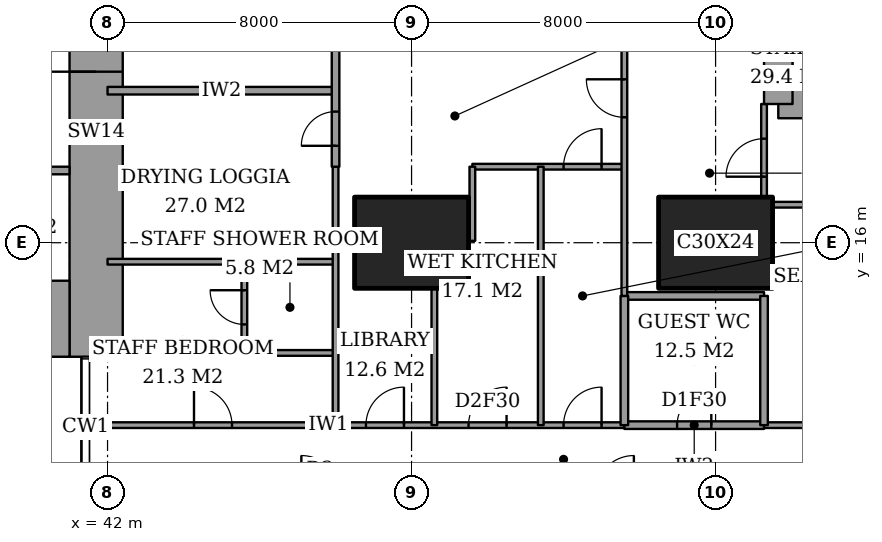
"""IFC4 building model, lengths in metres.
Left out: names, types, materials, properties, quantities, classifications, styles, units other than length and angle.
Written with IfcOpenShell. Run it as: python <this file> out.ifc"""

import sys

from ifc_helpers import new_model, si_unit, direction, frame, frame_2d, origin, origin_2d, place, context, subcontext, project, spatial, rectangle, extrude, element, fill, save


model = new_model("IFC4")
c1 = context("Model", 3, precision=1e-05, world=origin(), true_north=direction((0.0, 1.0)))
c2 = subcontext(c1, "Body", "Model", "MODEL_VIEW")
j1 = project(units=[si_unit("LENGTHUNIT", "METRE"), si_unit("PLANEANGLEUNIT", "RADIAN")], contexts=[c1])
p1 = place(None, origin())
s1 = spatial("IfcSite", under=j1, at=p1, CompositionType="ELEMENT")
p2 = place(p1, origin())
s2 = spatial("IfcBuilding", under=s1, at=p2, CompositionType="ELEMENT")
p3 = place(p2, frame((0.0, 0.0, 259.2)))
s3 = spatial("IfcBuildingStorey", under=s2, at=p3, CompositionType="ELEMENT", Elevation=259.2)
for number, where, z_axis, x_axis in (
    (1, (50.0, 16.0, 0.0), (0.0, 0.0, 1.0), (1.0, 0.0, 0.0)),
    (2, (58.0, 16.0, 0.0), (0.0, 0.0, 1.0), (1.0, 0.0, 0.0)),
):
    element("IfcColumn", number, at=place(p3, frame(where, z_axis=z_axis, x_axis=x_axis)), inside=s3, PredefinedType="COLUMN", context=c2, shape_type="SweptSolid", body=[
        extrude(rectangle(XDim=3.0, YDim=2.4, at=origin_2d()), origin(), (0.0, 0.0, 1.0), 3.6),
    ])
p4 = place(p3, frame((37.85, 14.0, 0.0), z_axis=(0.0, 0.0, 1.0), x_axis=(1.0, 0.0, 0.0)))
e3 = element("IfcWall", 3, at=p4, inside=s3, PredefinedType="SHEAR", context=c2, shape_type="SweptSolid", body=[
    extrude(rectangle(XDim=3.15, YDim=2.0, at=frame_2d((1.575, 0.0))), origin(), (0.0, 0.0, 1.0), 3.6),
])
p5 = place(p3, frame((41.7, 13.0, 0.0), z_axis=(0.0, 0.0, 1.0), x_axis=(0.0, 1.0, 0.0)))
e4 = element("IfcWall", 4, at=p5, inside=s3, PredefinedType="SHEAR", context=c2, shape_type="SweptSolid", body=[
    extrude(rectangle(XDim=11.85, YDim=1.4, at=frame_2d((5.925, 0.0))), origin(), (0.0, 0.0, 1.0), 3.6),
])
p6 = place(p5, frame((7.5, 0.0, 0.0)))
e5 = element("IfcOpeningElement", 5, at=p6, cuts=e4, PredefinedType="OPENING", context=c2, shape_type="SweptSolid", body=[
    extrude(rectangle(XDim=1.8, YDim=2.4, at=frame_2d((0.9, 1.2))), frame((0.0, 0.71, 0.0), z_axis=(0.0, -1.0, 0.0), x_axis=(1.0, 0.0, 0.0)), (0.0, 0.0, 1.0), 1.42),
])
p7 = place(p3, frame((59.65, 19.65, 0.0), z_axis=(0.0, 0.0, 1.0), x_axis=(1.0, 0.0, 0.0)))
e6 = element("IfcWall", 6, at=p7, inside=s3, PredefinedType="SHEAR", context=c2, shape_type="SweptSolid", body=[
    extrude(rectangle(XDim=4.45, YDim=0.75, at=frame_2d((2.225, 0.0))), origin(), (0.0, 0.0, 1.0), 3.6),
])
p8 = place(p3, frame((59.65, 28.35, 0.0), z_axis=(0.0, 0.0, 1.0), x_axis=(0.0, -1.0, 0.0)))
e7 = element("IfcWall", 7, at=p8, inside=s3, PredefinedType="SHEAR", context=c2, shape_type="SweptSolid", body=[
    extrude(rectangle(XDim=8.7, YDim=0.75, at=frame_2d((4.35, 0.0))), origin(), (0.0, 0.0, 1.0), 3.6),
])
p9 = place(p8, frame((0.975, 0.0, 0.0)))
e8 = element("IfcOpeningElement", 8, at=p9, cuts=e7, PredefinedType="OPENING", context=c2, shape_type="SweptSolid", body=[
    extrude(rectangle(XDim=1.0, YDim=2.1, at=frame_2d((0.5, 1.05))), frame((0.0, 0.385, 0.0), z_axis=(0.0, -1.0, 0.0), x_axis=(1.0, 0.0, 0.0)), (0.0, 0.0, 1.0), 0.77),
])
p10 = place(p3, frame((55.6, 11.2, 0.0), z_axis=(0.0, 0.0, 1.0), x_axis=(1.0, 0.0, 0.0)))
e9 = element("IfcWall", 9, at=p10, inside=s3, PredefinedType="PARTITIONING", context=c2, shape_type="SweptSolid", body=[
    extrude(rectangle(XDim=3.675, YDim=0.2, at=frame_2d((1.837, 0.0))), origin(), (0.0, 0.0, 1.0), 3.35),
])
p11 = place(p10, frame((1.387, 0.0, 0.0)))
e10 = element("IfcOpeningElement", 10, at=p11, cuts=e9, PredefinedType="OPENING", context=c2, shape_type="SweptSolid", body=[
    extrude(rectangle(XDim=0.9, YDim=2.1, at=frame_2d((0.45, 1.05))), frame((0.0, 0.11, 0.0), z_axis=(0.0, -1.0, 0.0), x_axis=(1.0, 0.0, 0.0)), (0.0, 0.0, 1.0), 0.22),
])
p12 = place(p3, frame((41.439, 11.2, 0.0), z_axis=(0.0, 0.0, 1.0), x_axis=(1.0, 0.0, 0.0)))
e11 = element("IfcWall", 11, at=p12, inside=s3, PredefinedType="PARTITIONING", context=c2, shape_type="SweptSolid", body=[
    extrude(rectangle(XDim=14.161, YDim=0.15, at=frame_2d((7.081, 0.0))), origin(), (0.0, 0.0, 1.0), 3.35),
])
p13 = place(p12, frame((12.561, 0.0, 0.0)))
e12 = element("IfcOpeningElement", 12, at=p13, cuts=e11, PredefinedType="OPENING", context=c2, shape_type="SweptSolid", body=[
    extrude(rectangle(XDim=1.0, YDim=2.1, at=frame_2d((0.5, 1.05))), frame((0.0, 0.085, 0.0), z_axis=(0.0, -1.0, 0.0), x_axis=(1.0, 0.0, 0.0)), (0.0, 0.0, 1.0), 0.17),
])
p14 = place(p12, frame((10.061, 0.0, 0.0)))
e13 = element("IfcOpeningElement", 13, at=p14, cuts=e11, PredefinedType="OPENING", context=c2, shape_type="SweptSolid", body=[
    extrude(rectangle(XDim=1.0, YDim=2.1, at=frame_2d((0.5, 1.05))), frame((0.0, 0.085, 0.0), z_axis=(0.0, -1.0, 0.0), x_axis=(1.0, 0.0, 0.0)), (0.0, 0.0, 1.0), 0.17),
])
p15 = place(p12, frame((7.361, 0.0, 0.0)))
e14 = element("IfcOpeningElement", 14, at=p15, cuts=e11, PredefinedType="OPENING", context=c2, shape_type="SweptSolid", body=[
    extrude(rectangle(XDim=1.0, YDim=2.1, at=frame_2d((0.5, 1.05))), frame((0.0, 0.085, 0.0), z_axis=(0.0, -1.0, 0.0), x_axis=(1.0, 0.0, 0.0)), (0.0, 0.0, 1.0), 0.17),
])
p16 = place(p12, frame((2.836, 0.0, 0.0)))
e15 = element("IfcOpeningElement", 15, at=p16, cuts=e11, PredefinedType="OPENING", context=c2, shape_type="SweptSolid", body=[
    extrude(rectangle(XDim=1.0, YDim=2.1, at=frame_2d((0.5, 1.05))), frame((0.0, 0.085, 0.0), z_axis=(0.0, -1.0, 0.0), x_axis=(1.0, 0.0, 0.0)), (0.0, 0.0, 1.0), 0.17),
])
p17 = place(p3, frame((59.275, 11.2, 0.0), z_axis=(0.0, 0.0, 1.0), x_axis=(1.0, 0.0, 0.0)))
e16 = element("IfcWall", 16, at=p17, inside=s3, PredefinedType="PARTITIONING", context=c2, shape_type="SweptSolid", body=[
    extrude(rectangle(XDim=7.175, YDim=0.15, at=frame_2d((3.587, 0.0))), origin(), (0.0, 0.0, 1.0), 3.35),
])
p18 = place(p17, frame((3.087, 0.0, 0.0)))
e17 = element("IfcOpeningElement", 17, at=p18, cuts=e16, PredefinedType="OPENING", context=c2, shape_type="SweptSolid", body=[
    extrude(rectangle(XDim=1.0, YDim=2.1, at=frame_2d((0.5, 1.05))), frame((0.0, 0.085, 0.0), z_axis=(0.0, -1.0, 0.0), x_axis=(1.0, 0.0, 0.0)), (0.0, 0.0, 1.0), 0.17),
])
p19 = place(p3, frame((45.6, 13.1, 0.0), z_axis=(0.0, 0.0, 1.0), x_axis=(1.0, 0.0, 0.0)))
e18 = element("IfcWall", 18, at=p19, inside=s3, PredefinedType="PARTITIONING", context=c2, shape_type="SweptSolid", body=[
    extrude(rectangle(XDim=2.4, YDim=0.15, at=frame_2d((1.2, 0.0))), origin(), (0.0, 0.0, 1.0), 3.35),
])
p20 = place(p3, frame((55.6, 14.6, 0.0), z_axis=(0.0, 0.0, 1.0), x_axis=(1.0, 0.0, 0.0)))
e19 = element("IfcWall", 19, at=p20, inside=s3, PredefinedType="PARTITIONING", context=c2, shape_type="SweptSolid", body=[
    extrude(rectangle(XDim=3.675, YDim=0.2, at=frame_2d((1.837, 0.0))), origin(), (0.0, 0.0, 1.0), 3.35),
])
p21 = place(p3, frame((42.0, 15.5, 0.0), z_axis=(0.0, 0.0, 1.0), x_axis=(1.0, 0.0, 0.0)))
e20 = element("IfcWall", 20, at=p21, inside=s3, PredefinedType="PARTITIONING", context=c2, shape_type="SweptSolid", body=[
    extrude(rectangle(XDim=6.0, YDim=0.15, at=frame_2d((3.0, 0.0))), origin(), (0.0, 0.0, 1.0), 3.35),
])
p22 = place(p3, frame((48.0, 16.05, 0.0), z_axis=(0.0, 0.0, 1.0), x_axis=(1.0, 0.0, 0.0)))
e21 = element("IfcWall", 21, at=p22, inside=s3, PredefinedType="PARTITIONING", context=c2, shape_type="SweptSolid", body=[
    extrude(rectangle(XDim=0.5, YDim=0.15, at=frame_2d((0.25, 0.0))), origin(), (0.0, 0.0, 1.0), 2.634),
])
p23 = place(p3, frame((59.5, 17.0, 0.0), z_axis=(0.0, 0.0, 1.0), x_axis=(1.0, 0.0, 0.0)))
e22 = element("IfcWall", 22, at=p23, inside=s3, PredefinedType="PARTITIONING", context=c2, shape_type="SweptSolid", body=[
    extrude(rectangle(XDim=6.95, YDim=0.15, at=frame_2d((3.475, 0.0))), origin(), (0.0, 0.0, 1.0), 3.35),
])
p24 = place(p3, frame((51.6, 18.0, 0.0), z_axis=(0.0, 0.0, 1.0), x_axis=(1.0, 0.0, 0.0)))
e23 = element("IfcWall", 23, at=p24, inside=s3, PredefinedType="PARTITIONING", context=c2, shape_type="SweptSolid", body=[
    extrude(rectangle(XDim=4.0, YDim=0.15, at=frame_2d((2.0, 0.0))), origin(), (0.0, 0.0, 1.0), 3.35),
])
p25 = place(p24, frame((2.4, 0.0, 0.0)))
e24 = element("IfcOpeningElement", 24, at=p25, cuts=e23, PredefinedType="OPENING", context=c2, shape_type="SweptSolid", body=[
    extrude(rectangle(XDim=1.0, YDim=2.1, at=frame_2d((0.5, 1.05))), frame((0.0, 0.085, 0.0), z_axis=(0.0, -1.0, 0.0), x_axis=(1.0, 0.0, 0.0)), (0.0, 0.0, 1.0), 0.17),
])
p26 = place(p3, frame((42.0, 20.0, 0.0), z_axis=(0.0, 0.0, 1.0), x_axis=(1.0, 0.0, 0.0)))
e25 = element("IfcWall", 25, at=p26, inside=s3, PredefinedType="PARTITIONING", context=c2, shape_type="SweptSolid", body=[
    extrude(rectangle(XDim=6.0, YDim=0.2, at=frame_2d((3.0, 0.0))), origin(), (0.0, 0.0, 1.0), 3.35),
])
p27 = place(p3, frame((45.6, 13.1, 0.0), z_axis=(0.0, 0.0, 1.0), x_axis=(0.0, 1.0, 0.0)))
e26 = element("IfcWall", 26, at=p27, inside=s3, PredefinedType="PARTITIONING", context=c2, shape_type="SweptSolid", body=[
    extrude(rectangle(XDim=2.4, YDim=0.15, at=frame_2d((1.2, 0.0))), origin(), (0.0, 0.0, 1.0), 3.35),
])
p28 = place(p27, frame((0.75, 0.0, 0.0)))
e27 = element("IfcOpeningElement", 27, at=p28, cuts=e26, PredefinedType="OPENING", context=c2, shape_type="SweptSolid", body=[
    extrude(rectangle(XDim=0.9, YDim=2.1, at=frame_2d((0.45, 1.05))), frame((0.0, 0.085, 0.0), z_axis=(0.0, -1.0, 0.0), x_axis=(1.0, 0.0, 0.0)), (0.0, 0.0, 1.0), 0.17),
])
p29 = place(p3, frame((48.0, 18.0, 0.0), z_axis=(0.0, 0.0, 1.0), x_axis=(0.0, 1.0, 0.0)))
e28 = element("IfcWall", 28, at=p29, inside=s3, PredefinedType="PARTITIONING", context=c2, shape_type="SweptSolid", body=[
    extrude(rectangle(XDim=6.0, YDim=0.2, at=frame_2d((3.0, 0.0))), origin(), (0.0, 0.0, 1.0), 3.35),
])
p30 = place(p29, frame((3.4, 0.0, 0.0)))
e29 = element("IfcOpeningElement", 29, at=p30, cuts=e28, PredefinedType="OPENING", context=c2, shape_type="SweptSolid", body=[
    extrude(rectangle(XDim=1.2, YDim=2.4, at=frame_2d((0.6, 1.2))), frame((0.0, 0.11, 0.0), z_axis=(0.0, -1.0, 0.0), x_axis=(1.0, 0.0, 0.0)), (0.0, 0.0, 1.0), 0.22),
])
p31 = place(p29, frame((0.55, 0.0, 0.0)))
e30 = element("IfcOpeningElement", 30, at=p31, cuts=e28, PredefinedType="OPENING", context=c2, shape_type="SweptSolid", body=[
    extrude(rectangle(XDim=0.9, YDim=2.1, at=frame_2d((0.45, 1.05))), frame((0.0, 0.11, 0.0), z_axis=(0.0, -1.0, 0.0), x_axis=(1.0, 0.0, 0.0)), (0.0, 0.0, 1.0), 0.22),
])
p32 = place(p3, frame((48.0, 11.2, 0.0), z_axis=(0.0, 0.0, 1.0), x_axis=(0.0, 1.0, 0.0)))
e31 = element("IfcWall", 31, at=p32, inside=s3, PredefinedType="PARTITIONING", context=c2, shape_type="SweptSolid", body=[
    extrude(rectangle(XDim=6.8, YDim=0.15, at=frame_2d((3.4, 0.0))), origin(), (0.0, 0.0, 1.0), 3.35),
])
p33 = place(p3, frame((50.6, 11.2, 0.0), z_axis=(0.0, 0.0, 1.0), x_axis=(0.0, 1.0, 0.0)))
e32 = element("IfcWall", 32, at=p33, inside=s3, PredefinedType="PARTITIONING", context=c2, shape_type="SweptSolid", body=[
    extrude(rectangle(XDim=3.6, YDim=0.15, at=frame_2d((1.8, 0.0))), origin(), (0.0, 0.0, 1.0), 3.35),
])
p34 = place(p3, frame((51.6, 16.05, 0.0), z_axis=(0.0, 0.0, 1.0), x_axis=(0.0, 1.0, 0.0)))
e33 = element("IfcWall", 33, at=p34, inside=s3, PredefinedType="PARTITIONING", context=c2, shape_type="SweptSolid", body=[
    extrude(rectangle(XDim=1.95, YDim=0.15, at=frame_2d((0.975, 0.0))), origin(), (0.0, 0.0, 1.0), 3.35),
])
p35 = place(p3, frame((53.4, 11.2, 0.0), z_axis=(0.0, 0.0, 1.0), x_axis=(0.0, 1.0, 0.0)))
e34 = element("IfcWall", 34, at=p35, inside=s3, PredefinedType="PARTITIONING", context=c2, shape_type="SweptSolid", body=[
    extrude(rectangle(XDim=6.8, YDim=0.15, at=frame_2d((3.4, 0.0))), origin(), (0.0, 0.0, 1.0), 3.35),
])
p36 = place(p3, frame((55.6, 11.2, 0.0), z_axis=(0.0, 0.0, 1.0), x_axis=(0.0, 1.0, 0.0)))
e35 = element("IfcWall", 35, at=p36, inside=s3, PredefinedType="PARTITIONING", context=c2, shape_type="SweptSolid", body=[
    extrude(rectangle(XDim=3.4, YDim=0.2, at=frame_2d((1.7, 0.0))), origin(), (0.0, 0.0, 1.0), 3.35),
])
p37 = place(p3, frame((55.6, 14.6, 0.0), z_axis=(0.0, 0.0, 1.0), x_axis=(0.0, 1.0, 0.0)))
e36 = element("IfcWall", 36, at=p37, inside=s3, PredefinedType="PARTITIONING", context=c2, shape_type="SweptSolid", body=[
    extrude(rectangle(XDim=7.0, YDim=0.15, at=frame_2d((3.5, 0.0))), origin(), (0.0, 0.0, 1.0), 3.35),
])
p38 = place(p37, frame((4.7, 0.0, 0.0)))
e37 = element("IfcOpeningElement", 37, at=p38, cuts=e36, PredefinedType="OPENING", context=c2, shape_type="SweptSolid", body=[
    extrude(rectangle(XDim=1.0, YDim=2.1, at=frame_2d((0.5, 1.05))), frame((0.0, 0.085, 0.0), z_axis=(0.0, -1.0, 0.0), x_axis=(1.0, 0.0, 0.0)), (0.0, 0.0, 1.0), 0.17),
])
p39 = place(p3, frame((59.275, 11.2, 0.0), z_axis=(0.0, 0.0, 1.0), x_axis=(0.0, 1.0, 0.0)))
e38 = element("IfcWall", 38, at=p39, inside=s3, PredefinedType="PARTITIONING", context=c2, shape_type="SweptSolid", body=[
    extrude(rectangle(XDim=3.4, YDim=0.2, at=frame_2d((1.7, 0.0))), origin(), (0.0, 0.0, 1.0), 3.35),
])
p40 = place(p3, frame((59.275, 17.2, 0.0), z_axis=(0.0, 0.0, 1.0), x_axis=(0.0, 1.0, 0.0)))
e39 = element("IfcWall", 39, at=p40, inside=s3, PredefinedType="PARTITIONING", context=c2, shape_type="SweptSolid", body=[
    extrude(rectangle(XDim=2.45, YDim=0.15, at=frame_2d((1.225, 0.0))), origin(), (0.0, 0.0, 1.0), 3.35),
])
p41 = place(p40, frame((0.538, 0.0, 0.0)))
e40 = element("IfcOpeningElement", 40, at=p41, cuts=e39, PredefinedType="OPENING", context=c2, shape_type="SweptSolid", body=[
    extrude(rectangle(XDim=1.0, YDim=2.1, at=frame_2d((0.5, 1.05))), frame((0.0, 0.085, 0.0), z_axis=(0.0, -1.0, 0.0), x_axis=(1.0, 0.0, 0.0)), (0.0, 0.0, 1.0), 0.17),
])
p42 = place(p3, frame((28.3, 17.9, 0.0), z_axis=(0.0, 0.0, 1.0), x_axis=(1.0, 0.0, 0.0)))
e41 = element("IfcWall", 41, at=p42, inside=s3, PredefinedType="PARTITIONING", context=c2, shape_type="SweptSolid", body=[
    extrude(rectangle(XDim=12.7, YDim=0.2, at=frame_2d((6.35, 0.0))), origin(), (0.0, 0.0, 1.0), 3.6),
])
p43 = place(p42, frame((1.05, 0.0, 0.0)))
e42 = element("IfcOpeningElement", 42, at=p43, cuts=e41, PredefinedType="OPENING", context=c2, shape_type="SweptSolid", body=[
    extrude(rectangle(XDim=0.9, YDim=2.1, at=frame_2d((0.45, 1.05))), frame((0.0, 0.11, 0.0), z_axis=(0.0, -1.0, 0.0), x_axis=(1.0, 0.0, 0.0)), (0.0, 0.0, 1.0), 0.22),
])
p44 = place(p42, frame((4.25, 0.0, 0.0)))
e43 = element("IfcOpeningElement", 43, at=p44, cuts=e41, PredefinedType="OPENING", context=c2, shape_type="SweptSolid", body=[
    extrude(rectangle(XDim=0.9, YDim=2.1, at=frame_2d((0.45, 1.05))), frame((0.0, 0.11, 0.0), z_axis=(0.0, -1.0, 0.0), x_axis=(1.0, 0.0, 0.0)), (0.0, 0.0, 1.0), 0.22),
])
p45 = place(p42, frame((10.6, 0.0, 0.0)))
e44 = element("IfcOpeningElement", 44, at=p45, cuts=e41, PredefinedType="OPENING", context=c2, shape_type="SweptSolid", body=[
    extrude(rectangle(XDim=1.2, YDim=2.1, at=frame_2d((0.6, 1.05))), frame((0.0, 0.11, 0.0), z_axis=(0.0, -1.0, 0.0), x_axis=(1.0, 0.0, 0.0)), (0.0, 0.0, 1.0), 0.22),
])
p46 = place(p13, origin())
e45 = element("IfcDoor", 45, at=p46, inside=s3, OperationType="SINGLE_SWING_LEFT", PredefinedType="DOOR", context=c2, shape_type="SweptSolid", body=[
    extrude(rectangle(XDim=1.0, YDim=2.1, at=frame_2d((0.5, 1.05))), frame((0.0, 0.025, 0.0), z_axis=(0.0, -1.0, 0.0), x_axis=(1.0, 0.0, 0.0)), (0.0, 0.0, 1.0), 0.05),
])
fill(e12, e45)
p47 = place(p41, origin())
e46 = element("IfcDoor", 46, at=p47, inside=s3, OperationType="SINGLE_SWING_RIGHT", PredefinedType="DOOR", context=c2, shape_type="SweptSolid", body=[
    extrude(rectangle(XDim=1.0, YDim=2.1, at=frame_2d((0.5, 1.05))), frame((0.0, 0.025, 0.0), z_axis=(0.0, -1.0, 0.0), x_axis=(1.0, 0.0, 0.0)), (0.0, 0.0, 1.0), 0.05),
])
fill(e40, e46)
p48 = place(p11, origin())
e47 = element("IfcDoor", 47, at=p48, inside=s3, OperationType="SINGLE_SWING_LEFT", PredefinedType="DOOR", context=c2, shape_type="SweptSolid", body=[
    extrude(rectangle(XDim=0.9, YDim=2.1, at=frame_2d((0.45, 1.05))), frame((0.0, 0.025, 0.0), z_axis=(0.0, -1.0, 0.0), x_axis=(1.0, 0.0, 0.0)), (0.0, 0.0, 1.0), 0.05),
])
fill(e10, e47)
p49 = place(p38, origin())
e48 = element("IfcDoor", 48, at=p49, inside=s3, OperationType="SINGLE_SWING_LEFT", PredefinedType="DOOR", context=c2, shape_type="SweptSolid", body=[
    extrude(rectangle(XDim=1.0, YDim=2.1, at=frame_2d((0.5, 1.05))), frame((0.0, 0.025, 0.0), z_axis=(0.0, -1.0, 0.0), x_axis=(1.0, 0.0, 0.0)), (0.0, 0.0, 1.0), 0.05),
])
fill(e37, e48)
p50 = place(p25, origin())
e49 = element("IfcDoor", 49, at=p50, inside=s3, OperationType="SINGLE_SWING_LEFT", PredefinedType="DOOR", context=c2, shape_type="SweptSolid", body=[
    extrude(rectangle(XDim=1.0, YDim=2.1, at=frame_2d((0.5, 1.05))), frame((0.0, 0.025, 0.0), z_axis=(0.0, -1.0, 0.0), x_axis=(1.0, 0.0, 0.0)), (0.0, 0.0, 1.0), 0.05),
])
fill(e24, e49)
p51 = place(p14, origin())
e50 = element("IfcDoor", 50, at=p51, inside=s3, OperationType="SINGLE_SWING_LEFT", PredefinedType="DOOR", context=c2, shape_type="SweptSolid", body=[
    extrude(rectangle(XDim=1.0, YDim=2.1, at=frame_2d((0.5, 1.05))), frame((0.0, 0.025, 0.0), z_axis=(0.0, -1.0, 0.0), x_axis=(1.0, 0.0, 0.0)), (0.0, 0.0, 1.0), 0.05),
])
fill(e13, e50)
p52 = place(p15, origin())
e51 = element("IfcDoor", 51, at=p52, inside=s3, OperationType="SINGLE_SWING_LEFT", PredefinedType="DOOR", context=c2, shape_type="SweptSolid", body=[
    extrude(rectangle(XDim=1.0, YDim=2.1, at=frame_2d((0.5, 1.05))), frame((0.0, 0.025, 0.0), z_axis=(0.0, -1.0, 0.0), x_axis=(1.0, 0.0, 0.0)), (0.0, 0.0, 1.0), 0.05),
])
fill(e14, e51)
p53 = place(p28, origin())
e52 = element("IfcDoor", 52, at=p53, inside=s3, OperationType="SINGLE_SWING_LEFT", PredefinedType="DOOR", context=c2, shape_type="SweptSolid", body=[
    extrude(rectangle(XDim=0.9, YDim=2.1, at=frame_2d((0.45, 1.05))), frame((0.0, 0.025, 0.0), z_axis=(0.0, -1.0, 0.0), x_axis=(1.0, 0.0, 0.0)), (0.0, 0.0, 1.0), 0.05),
])
fill(e27, e52)
p54 = place(p16, origin())
e53 = element("IfcDoor", 53, at=p54, inside=s3, OperationType="SINGLE_SWING_RIGHT", PredefinedType="DOOR", context=c2, shape_type="SweptSolid", body=[
    extrude(rectangle(XDim=1.0, YDim=2.1, at=frame_2d((0.5, 1.05))), frame((0.0, 0.025, 0.0), z_axis=(0.0, -1.0, 0.0), x_axis=(1.0, 0.0, 0.0)), (0.0, 0.0, 1.0), 0.05),
])
fill(e15, e53)
p55 = place(p31, origin())
e54 = element("IfcDoor", 54, at=p55, inside=s3, OperationType="SINGLE_SWING_RIGHT", PredefinedType="DOOR", context=c2, shape_type="SweptSolid", body=[
    extrude(rectangle(XDim=0.9, YDim=2.1, at=frame_2d((0.45, 1.05))), frame((0.0, 0.025, 0.0), z_axis=(0.0, -1.0, 0.0), x_axis=(1.0, 0.0, 0.0)), (0.0, 0.0, 1.0), 0.05),
])
fill(e30, e54)
p56 = place(p6, origin())
e55 = element("IfcDoor", 55, at=p56, inside=s3, OperationType="DOUBLE_DOOR_DOUBLE_SWING", PredefinedType="DOOR", context=c2, shape_type="SweptSolid", body=[
    extrude(rectangle(XDim=1.8, YDim=2.4, at=frame_2d((0.9, 1.2))), frame((0.0, 0.025, 0.0), z_axis=(0.0, -1.0, 0.0), x_axis=(1.0, 0.0, 0.0)), (0.0, 0.0, 1.0), 0.05),
])
fill(e5, e55)
save(model, sys.argv[1])
